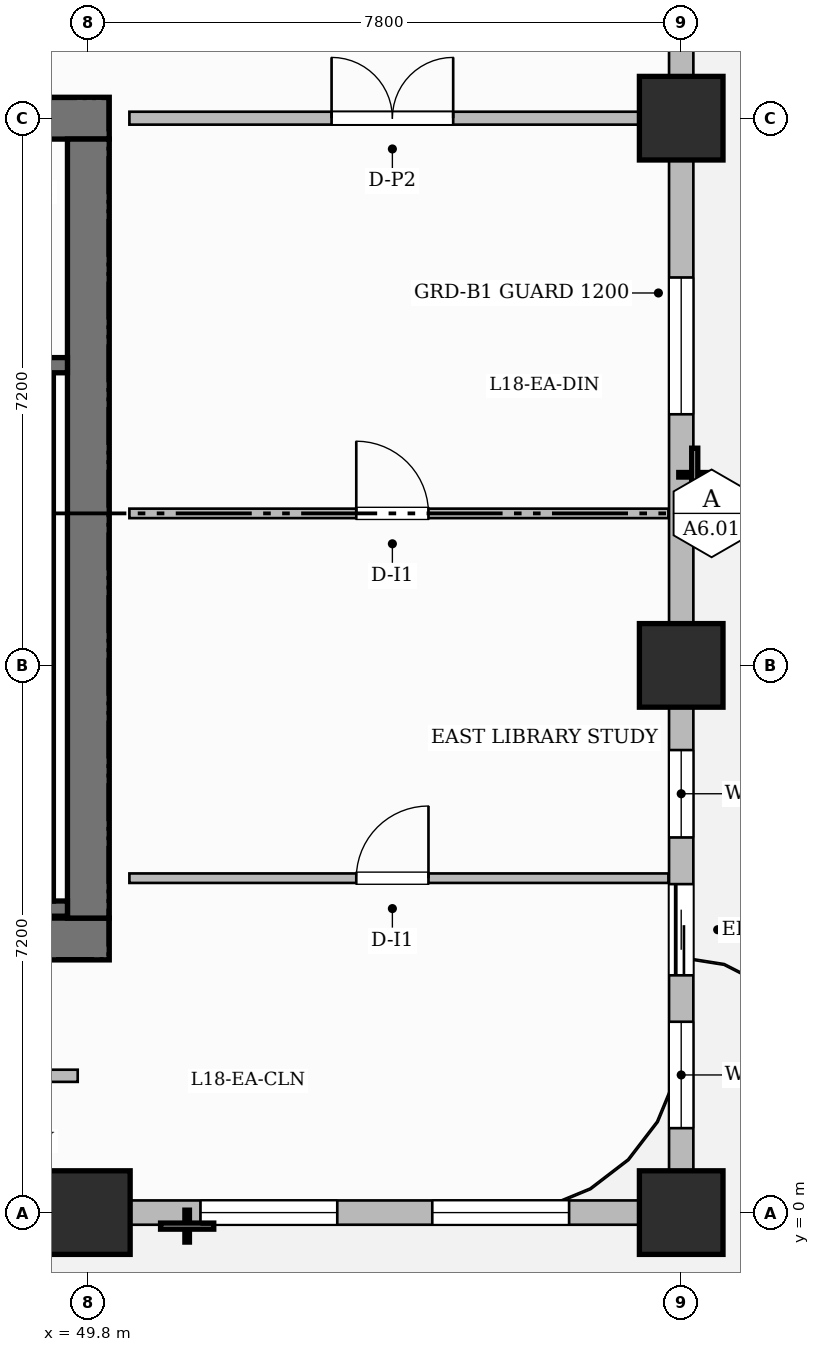
"""IFC4 building model, lengths in metres.
Left out: names, types, materials, properties, quantities, classifications, styles, units other than length and angle.
Written with IfcOpenShell. Run it as: python <this file> out.ifc"""

import sys

from ifc_helpers import new_model, si_unit, direction, frame, frame_2d, origin, origin_2d, place, context, subcontext, project, spatial, rectangle, extrude, source, transform, mapped, element, fill, save


model = new_model("IFC4")
c1 = context("Model", 3, precision=1e-05, world=origin(), true_north=direction((0.0, 1.0)))
c2 = subcontext(c1, "Body", "Model", "MODEL_VIEW")
j1 = project(units=[si_unit("LENGTHUNIT", "METRE"), si_unit("PLANEANGLEUNIT", "RADIAN")], contexts=[c1])
p1 = place(None, origin())
s1 = spatial("IfcSite", under=j1, at=p1, CompositionType="ELEMENT")
p2 = place(p1, origin())
s2 = spatial("IfcBuilding", under=s1, at=p2, CompositionType="ELEMENT")
p3 = place(p2, frame((0.0, 0.0, 76.8)))
s3 = spatial("IfcBuildingStorey", under=s2, at=p3, CompositionType="ELEMENT", Elevation=76.8)
p4 = place(p3, frame((34.525, 3.6, 0.0), z_axis=(0.0, 0.0, 1.0), x_axis=(1.0, 0.0, 0.0)))
e1 = element("IfcWall", 1, at=p4, inside=s3, PredefinedType="SHEAR", context=c2, shape_type="SweptSolid", body=[
    extrude(rectangle(XDim=15.55, YDim=0.55, at=frame_2d((7.775, 0.0))), origin(), (0.0, 0.0, 1.0), 3.7),
])
p5 = place(p4, frame((4.475, 0.0, 0.0)))
e2 = element("IfcOpeningElement", 2, at=p5, cuts=e1, PredefinedType="OPENING", context=c2, shape_type="SweptSolid", body=[
    extrude(rectangle(XDim=0.9, YDim=2.1, at=frame_2d((0.45, 1.05))), frame((0.0, 0.285, 0.0), z_axis=(0.0, -1.0, 0.0), x_axis=(1.0, 0.0, 0.0)), (0.0, 0.0, 1.0), 0.57),
])
p6 = place(p4, frame((6.925, 0.0, 0.0)))
e3 = element("IfcOpeningElement", 3, at=p6, cuts=e1, PredefinedType="OPENING", context=c2, shape_type="SweptSolid", body=[
    extrude(rectangle(XDim=0.9, YDim=2.1, at=frame_2d((0.45, 1.05))), frame((0.0, 0.285, 0.0), z_axis=(0.0, -1.0, 0.0), x_axis=(1.0, 0.0, 0.0)), (0.0, 0.0, 1.0), 0.57),
])
p7 = place(p3, frame((34.525, 14.4, 0.0), z_axis=(0.0, 0.0, 1.0), x_axis=(1.0, 0.0, 0.0)))
e4 = element("IfcWall", 4, at=p7, inside=s3, PredefinedType="SHEAR", context=c2, shape_type="SweptSolid", body=[
    extrude(rectangle(XDim=15.55, YDim=0.55, at=frame_2d((7.775, 0.0))), origin(), (0.0, 0.0, 1.0), 3.7),
])
p8 = place(p7, frame((5.405, 0.0, 0.0)))
e5 = element("IfcOpeningElement", 5, at=p8, cuts=e4, PredefinedType="OPENING", context=c2, shape_type="SweptSolid", body=[
    extrude(rectangle(XDim=1.5, YDim=2.2, at=frame_2d((0.75, 1.1))), frame((0.0, 0.285, 0.0), z_axis=(0.0, -1.0, 0.0), x_axis=(1.0, 0.0, 0.0)), (0.0, 0.0, 1.0), 0.57),
])
p9 = place(p7, frame((1.62, 0.0, 0.0)))
e6 = element("IfcOpeningElement", 6, at=p9, cuts=e4, PredefinedType="OPENING", context=c2, shape_type="SweptSolid", body=[
    extrude(rectangle(XDim=1.05, YDim=2.15, at=frame_2d((0.525, 1.075))), frame((0.0, 0.285, 0.0), z_axis=(0.0, -1.0, 0.0), x_axis=(1.0, 0.0, 0.0)), (0.0, 0.0, 1.0), 0.57),
])
p10 = place(p7, frame((11.25, 0.0, 0.0)))
e7 = element("IfcOpeningElement", 7, at=p10, cuts=e4, PredefinedType="OPENING", context=c2, shape_type="SweptSolid", body=[
    extrude(rectangle(XDim=1.05, YDim=2.15, at=frame_2d((0.525, 1.075))), frame((0.0, 0.285, 0.0), z_axis=(0.0, -1.0, 0.0), x_axis=(1.0, 0.0, 0.0)), (0.0, 0.0, 1.0), 0.57),
])
p11 = place(p3, frame((49.8, 3.875, 0.0), z_axis=(0.0, 0.0, 1.0), x_axis=(0.0, 1.0, 0.0)))
e8 = element("IfcWall", 8, at=p11, inside=s3, PredefinedType="SHEAR", context=c2, shape_type="SweptSolid", body=[
    extrude(rectangle(XDim=10.25, YDim=0.55, at=frame_2d((5.125, 0.0))), origin(), (0.0, 0.0, 1.0), 3.7),
])
m1 = source(origin(), c2, "Body", "SweptSolid", [
    extrude(rectangle(XDim=1.1, YDim=1.1, at=origin_2d()), origin(), (0.0, 0.0, 1.0), 3.7),
])
for number, where, z_axis, x_axis in (
    (9, (49.8, 0.0, 0.0), (0.0, 0.0, 1.0), (1.0, 0.0, 0.0)),
    (10, (57.6, 0.0, 0.0), (0.0, 0.0, 1.0), (1.0, 0.0, 0.0)),
    (11, (57.6, 7.2, 0.0), (0.0, 0.0, 1.0), (1.0, 0.0, 0.0)),
    (12, (57.6, 14.4, 0.0), (0.0, 0.0, 1.0), (1.0, 0.0, 0.0)),
):
    element("IfcColumn", number, at=place(p3, frame(where, z_axis=z_axis, x_axis=x_axis)), inside=s3, PredefinedType="COLUMN", context=c2, shape_type="MappedRepresentation", body=[
        mapped(m1, transform((0.0, 0.0, 0.0), scale=1.0)),
    ])
p12 = place(p3, frame((43.12, 4.0, 0.0), z_axis=(0.0, 0.0, 1.0), x_axis=(1.0, 0.0, 0.0)))
e13 = element("IfcWall", 13, at=p12, inside=s3, PredefinedType="SHEAR", context=c2, shape_type="SweptSolid", body=[
    extrude(rectangle(XDim=6.405, YDim=0.2, at=frame_2d((3.202, 0.0))), origin(), (0.0, 0.0, 1.0), 3.7),
])
p13 = place(p3, frame((49.24, 4.1, 0.0), z_axis=(0.0, 0.0, 1.0), x_axis=(0.0, 1.0, 0.0)))
e14 = element("IfcWall", 14, at=p13, inside=s3, PredefinedType="SHEAR", context=c2, shape_type="SweptSolid", body=[
    extrude(rectangle(XDim=6.95, YDim=0.2, at=frame_2d((3.475, 0.0))), origin(), (0.0, 0.0, 1.0), 3.7),
])
p14 = place(p3, frame((43.12, 11.15, 0.0), z_axis=(0.0, 0.0, 1.0), x_axis=(1.0, 0.0, 0.0)))
e15 = element("IfcWall", 15, at=p14, inside=s3, PredefinedType="SHEAR", context=c2, shape_type="SweptSolid", body=[
    extrude(rectangle(XDim=6.405, YDim=0.2, at=frame_2d((3.202, 0.0))), origin(), (0.0, 0.0, 1.0), 3.7),
])
p15 = place(p14, frame((1.045, 0.0, 0.0)))
e16 = element("IfcOpeningElement", 16, at=p15, cuts=e15, PredefinedType="OPENING", context=c2, shape_type="SweptSolid", body=[
    extrude(rectangle(XDim=1.05, YDim=2.2, at=frame_2d((0.525, 1.1))), frame((0.0, 0.11, 0.0), z_axis=(0.0, -1.0, 0.0), x_axis=(1.0, 0.0, 0.0)), (0.0, 0.0, 1.0), 0.22),
])
p16 = place(p14, frame((4.125, 0.0, 0.0)))
e17 = element("IfcOpeningElement", 17, at=p16, cuts=e15, PredefinedType="OPENING", context=c2, shape_type="SweptSolid", body=[
    extrude(rectangle(XDim=1.05, YDim=2.2, at=frame_2d((0.525, 1.1))), frame((0.0, 0.11, 0.0), z_axis=(0.0, -1.0, 0.0), x_axis=(1.0, 0.0, 0.0)), (0.0, 0.0, 1.0), 0.22),
])
p17 = place(p3, frame((30.29, 1.8, 0.0), z_axis=(0.0, 0.0, 1.0), x_axis=(1.0, 0.0, 0.0)))
e18 = element("IfcWall", 18, at=p17, inside=s3, PredefinedType="PARTITIONING", context=c2, shape_type="SweptSolid", body=[
    extrude(rectangle(XDim=19.37, YDim=0.16, at=frame_2d((9.685, 0.0))), origin(), (0.0, 0.0, 1.0), 3.45),
])
p18 = place(p17, frame((2.916, 0.0, 0.0)))
e19 = element("IfcOpeningElement", 19, at=p18, cuts=e18, PredefinedType="OPENING", context=c2, shape_type="SweptSolid", body=[
    extrude(rectangle(XDim=0.9, YDim=2.15, at=frame_2d((0.45, 1.075))), frame((0.0, 0.09, 0.0), z_axis=(0.0, -1.0, 0.0), x_axis=(1.0, 0.0, 0.0)), (0.0, 0.0, 1.0), 0.18),
])
p19 = place(p17, frame((9.66, 0.0, 0.0)))
e20 = element("IfcOpeningElement", 20, at=p19, cuts=e18, PredefinedType="OPENING", context=c2, shape_type="SweptSolid", body=[
    extrude(rectangle(XDim=0.9, YDim=2.15, at=frame_2d((0.45, 1.075))), frame((0.0, 0.09, 0.0), z_axis=(0.0, -1.0, 0.0), x_axis=(1.0, 0.0, 0.0)), (0.0, 0.0, 1.0), 0.18),
])
p20 = place(p17, frame((15.86, 0.0, 0.0)))
e21 = element("IfcOpeningElement", 21, at=p20, cuts=e18, PredefinedType="OPENING", context=c2, shape_type="SweptSolid", body=[
    extrude(rectangle(XDim=0.9, YDim=2.15, at=frame_2d((0.45, 1.075))), frame((0.0, 0.09, 0.0), z_axis=(0.0, -1.0, 0.0), x_axis=(1.0, 0.0, 0.0)), (0.0, 0.0, 1.0), 0.18),
])
p21 = place(p3, frame((50.34, 14.4, 0.0), z_axis=(0.0, 0.0, 1.0), x_axis=(1.0, 0.0, 0.0)))
e22 = element("IfcWall", 22, at=p21, inside=s3, PredefinedType="PARTITIONING", context=c2, shape_type="SweptSolid", body=[
    extrude(rectangle(XDim=7.07, YDim=0.17, at=frame_2d((3.535, 0.0))), origin(), (0.0, 0.0, 1.0), 2.885),
])
p22 = place(p21, frame((2.66, 0.0, 0.0)))
e23 = element("IfcOpeningElement", 23, at=p22, cuts=e22, PredefinedType="OPENING", context=c2, shape_type="SweptSolid", body=[
    extrude(rectangle(XDim=1.6, YDim=2.4, at=frame_2d((0.8, 1.2))), frame((0.0, 0.095, 0.0), z_axis=(0.0, -1.0, 0.0), x_axis=(1.0, 0.0, 0.0)), (0.0, 0.0, 1.0), 0.19),
])
p23 = place(p3, frame((50.34, 9.2, 0.0), z_axis=(0.0, 0.0, 1.0), x_axis=(1.0, 0.0, 0.0)))
e24 = element("IfcWall", 24, at=p23, inside=s3, PredefinedType="PARTITIONING", context=c2, shape_type="SweptSolid", body=[
    extrude(rectangle(XDim=7.092, YDim=0.125, at=frame_2d((3.546, 0.0))), origin(), (0.0, 0.0, 1.0), 3.45),
])
p24 = place(p23, frame((2.985, 0.0, 0.0)))
e25 = element("IfcOpeningElement", 25, at=p24, cuts=e24, PredefinedType="OPENING", context=c2, shape_type="SweptSolid", body=[
    extrude(rectangle(XDim=0.95, YDim=2.15, at=frame_2d((0.475, 1.075))), frame((0.0, 0.073, 0.0), z_axis=(0.0, -1.0, 0.0), x_axis=(1.0, 0.0, 0.0)), (0.0, 0.0, 1.0), 0.145),
])
p25 = place(p3, frame((50.34, 4.4, 0.0), z_axis=(0.0, 0.0, 1.0), x_axis=(1.0, 0.0, 0.0)))
e26 = element("IfcWall", 26, at=p25, inside=s3, PredefinedType="PARTITIONING", context=c2, shape_type="SweptSolid", body=[
    extrude(rectangle(XDim=7.092, YDim=0.125, at=frame_2d((3.546, 0.0))), origin(), (0.0, 0.0, 1.0), 3.45),
])
p26 = place(p25, frame((2.985, 0.0, 0.0)))
e27 = element("IfcOpeningElement", 27, at=p26, cuts=e26, PredefinedType="OPENING", context=c2, shape_type="SweptSolid", body=[
    extrude(rectangle(XDim=0.95, YDim=2.15, at=frame_2d((0.475, 1.075))), frame((0.0, 0.073, 0.0), z_axis=(0.0, -1.0, 0.0), x_axis=(1.0, 0.0, 0.0)), (0.0, 0.0, 1.0), 0.145),
])
p27 = place(p3, frame((14.4, 0.0, 0.0), z_axis=(0.0, 0.0, 1.0), x_axis=(1.0, 0.0, 0.0)))
e28 = element("IfcWall", 28, at=p27, inside=s3, PredefinedType="SOLIDWALL", context=c2, shape_type="SweptSolid", body=[
    extrude(rectangle(XDim=43.2, YDim=0.32, at=frame_2d((21.6, 0.0))), origin(), (0.0, 0.0, 1.0), 2.885),
])
p28 = place(p27, frame((0.85, 0.0, 0.0)))
e29 = element("IfcOpeningElement", 29, at=p28, cuts=e28, PredefinedType="OPENING", context=c2, shape_type="SweptSolid", body=[
    extrude(rectangle(XDim=1.2, YDim=2.2, at=frame_2d((0.6, 1.1))), frame((0.0, 0.17, 0.0), z_axis=(0.0, -1.0, 0.0), x_axis=(1.0, 0.0, 0.0)), (0.0, 0.0, 1.0), 0.34),
])
p29 = place(p27, frame((2.811, 0.0, 0.8)))
e30 = element("IfcOpeningElement", 30, at=p29, cuts=e28, PredefinedType="OPENING", context=c2, shape_type="SweptSolid", body=[
    extrude(rectangle(XDim=1.8, YDim=1.85, at=frame_2d((0.9, 0.925))), frame((0.0, 0.17, 0.0), z_axis=(0.0, -1.0, 0.0), x_axis=(1.0, 0.0, 0.0)), (0.0, 0.0, 1.0), 0.34),
])
p30 = place(p27, frame((5.269, 0.0, 0.8)))
e31 = element("IfcOpeningElement", 31, at=p30, cuts=e28, PredefinedType="OPENING", context=c2, shape_type="SweptSolid", body=[
    extrude(rectangle(XDim=0.95, YDim=1.75, at=frame_2d((0.475, 0.875))), frame((0.0, 0.17, 0.0), z_axis=(0.0, -1.0, 0.0), x_axis=(1.0, 0.0, 0.0)), (0.0, 0.0, 1.0), 0.34),
])
p31 = place(p27, frame((8.389, 0.0, 0.8)))
e32 = element("IfcOpeningElement", 32, at=p31, cuts=e28, PredefinedType="OPENING", context=c2, shape_type="SweptSolid", body=[
    extrude(rectangle(XDim=1.8, YDim=1.85, at=frame_2d((0.9, 0.925))), frame((0.0, 0.17, 0.0), z_axis=(0.0, -1.0, 0.0), x_axis=(1.0, 0.0, 0.0)), (0.0, 0.0, 1.0), 0.34),
])
p32 = place(p27, frame((11.197, 0.0, 0.8)))
e33 = element("IfcOpeningElement", 33, at=p32, cuts=e28, PredefinedType="OPENING", context=c2, shape_type="SweptSolid", body=[
    extrude(rectangle(XDim=1.8, YDim=1.85, at=frame_2d((0.9, 0.925))), frame((0.0, 0.17, 0.0), z_axis=(0.0, -1.0, 0.0), x_axis=(1.0, 0.0, 0.0)), (0.0, 0.0, 1.0), 0.34),
])
p33 = place(p27, frame((16.804, 0.0, 0.8)))
e34 = element("IfcOpeningElement", 34, at=p33, cuts=e28, PredefinedType="OPENING", context=c2, shape_type="SweptSolid", body=[
    extrude(rectangle(XDim=1.8, YDim=1.85, at=frame_2d((0.9, 0.925))), frame((0.0, 0.17, 0.0), z_axis=(0.0, -1.0, 0.0), x_axis=(1.0, 0.0, 0.0)), (0.0, 0.0, 1.0), 0.34),
])
p34 = place(p27, frame((21.521, 0.0, 0.8)))
e35 = element("IfcOpeningElement", 35, at=p34, cuts=e28, PredefinedType="OPENING", context=c2, shape_type="SweptSolid", body=[
    extrude(rectangle(XDim=0.95, YDim=1.75, at=frame_2d((0.475, 0.875))), frame((0.0, 0.17, 0.0), z_axis=(0.0, -1.0, 0.0), x_axis=(1.0, 0.0, 0.0)), (0.0, 0.0, 1.0), 0.34),
])
p35 = place(p27, frame((23.904, 0.0, 0.8)))
e36 = element("IfcOpeningElement", 36, at=p35, cuts=e28, PredefinedType="OPENING", context=c2, shape_type="SweptSolid", body=[
    extrude(rectangle(XDim=1.8, YDim=1.85, at=frame_2d((0.9, 0.925))), frame((0.0, 0.17, 0.0), z_axis=(0.0, -1.0, 0.0), x_axis=(1.0, 0.0, 0.0)), (0.0, 0.0, 1.0), 0.34),
])
p36 = place(p27, frame((29.681, 0.0, 0.8)))
e37 = element("IfcOpeningElement", 37, at=p36, cuts=e28, PredefinedType="OPENING", context=c2, shape_type="SweptSolid", body=[
    extrude(rectangle(XDim=1.8, YDim=1.85, at=frame_2d((0.9, 0.925))), frame((0.0, 0.17, 0.0), z_axis=(0.0, -1.0, 0.0), x_axis=(1.0, 0.0, 0.0)), (0.0, 0.0, 1.0), 0.34),
])
p37 = place(p27, frame((32.327, 0.0, 0.8)))
e38 = element("IfcOpeningElement", 38, at=p37, cuts=e28, PredefinedType="OPENING", context=c2, shape_type="SweptSolid", body=[
    extrude(rectangle(XDim=1.8, YDim=1.85, at=frame_2d((0.9, 0.925))), frame((0.0, 0.17, 0.0), z_axis=(0.0, -1.0, 0.0), x_axis=(1.0, 0.0, 0.0)), (0.0, 0.0, 1.0), 0.34),
])
p38 = place(p27, frame((36.875, 0.0, 0.8)))
e39 = element("IfcOpeningElement", 39, at=p38, cuts=e28, PredefinedType="OPENING", context=c2, shape_type="SweptSolid", body=[
    extrude(rectangle(XDim=1.8, YDim=1.85, at=frame_2d((0.9, 0.925))), frame((0.0, 0.17, 0.0), z_axis=(0.0, -1.0, 0.0), x_axis=(1.0, 0.0, 0.0)), (0.0, 0.0, 1.0), 0.34),
])
p39 = place(p27, frame((39.925, 0.0, 0.8)))
e40 = element("IfcOpeningElement", 40, at=p39, cuts=e28, PredefinedType="OPENING", context=c2, shape_type="SweptSolid", body=[
    extrude(rectangle(XDim=1.8, YDim=1.85, at=frame_2d((0.9, 0.925))), frame((0.0, 0.17, 0.0), z_axis=(0.0, -1.0, 0.0), x_axis=(1.0, 0.0, 0.0)), (0.0, 0.0, 1.0), 0.34),
])
p40 = place(p3, frame((57.6, 0.05, 0.0), z_axis=(0.0, 0.0, 1.0), x_axis=(0.0, 1.0, 0.0)))
e41 = element("IfcWall", 41, at=p40, inside=s3, PredefinedType="SOLIDWALL", context=c2, shape_type="SweptSolid", body=[
    extrude(rectangle(XDim=21.5, YDim=0.32, at=frame_2d((10.75, 0.0))), origin(), (0.0, 0.0, 1.0), 2.885),
])
p41 = place(p40, frame((3.072, 0.0, 0.0)))
e42 = element("IfcOpeningElement", 42, at=p41, cuts=e41, PredefinedType="OPENING", context=c2, shape_type="SweptSolid", body=[
    extrude(rectangle(XDim=1.2, YDim=2.2, at=frame_2d((0.6, 1.1))), frame((0.0, 0.17, 0.0), z_axis=(0.0, -1.0, 0.0), x_axis=(1.0, 0.0, 0.0)), (0.0, 0.0, 1.0), 0.34),
])
p42 = place(p40, frame((1.061, 0.0, 0.8)))
e43 = element("IfcOpeningElement", 43, at=p42, cuts=e41, PredefinedType="OPENING", context=c2, shape_type="SweptSolid", body=[
    extrude(rectangle(XDim=1.4, YDim=1.85, at=frame_2d((0.7, 0.925))), frame((0.0, 0.17, 0.0), z_axis=(0.0, -1.0, 0.0), x_axis=(1.0, 0.0, 0.0)), (0.0, 0.0, 1.0), 0.34),
])
p43 = place(p40, frame((4.886, 0.0, 0.8)))
e44 = element("IfcOpeningElement", 44, at=p43, cuts=e41, PredefinedType="OPENING", context=c2, shape_type="SweptSolid", body=[
    extrude(rectangle(XDim=1.15, YDim=1.8, at=frame_2d((0.575, 0.9))), frame((0.0, 0.17, 0.0), z_axis=(0.0, -1.0, 0.0), x_axis=(1.0, 0.0, 0.0)), (0.0, 0.0, 1.0), 0.34),
])
p44 = place(p40, frame((10.454, 0.0, 0.8)))
e45 = element("IfcOpeningElement", 45, at=p44, cuts=e41, PredefinedType="OPENING", context=c2, shape_type="SweptSolid", body=[
    extrude(rectangle(XDim=1.8, YDim=1.85, at=frame_2d((0.9, 0.925))), frame((0.0, 0.17, 0.0), z_axis=(0.0, -1.0, 0.0), x_axis=(1.0, 0.0, 0.0)), (0.0, 0.0, 1.0), 0.34),
])
p45 = place(p40, frame((15.621, 0.0, 0.8)))
e46 = element("IfcOpeningElement", 46, at=p45, cuts=e41, PredefinedType="OPENING", context=c2, shape_type="SweptSolid", body=[
    extrude(rectangle(XDim=1.4, YDim=1.85, at=frame_2d((0.7, 0.925))), frame((0.0, 0.17, 0.0), z_axis=(0.0, -1.0, 0.0), x_axis=(1.0, 0.0, 0.0)), (0.0, 0.0, 1.0), 0.34),
])
p46 = place(p40, frame((18.229, 0.0, 0.8)))
e47 = element("IfcOpeningElement", 47, at=p46, cuts=e41, PredefinedType="OPENING", context=c2, shape_type="SweptSolid", body=[
    extrude(rectangle(XDim=1.8, YDim=1.85, at=frame_2d((0.9, 0.925))), frame((0.0, 0.17, 0.0), z_axis=(0.0, -1.0, 0.0), x_axis=(1.0, 0.0, 0.0)), (0.0, 0.0, 1.0), 0.34),
])
m2 = source(origin(), c2, "Body", "SweptSolid", [
    extrude(rectangle(XDim=1.6, YDim=2.4, at=frame_2d((0.8, 1.2))), frame((0.0, 0.025, 0.0), z_axis=(0.0, -1.0, 0.0), x_axis=(1.0, 0.0, 0.0)), (0.0, 0.0, 1.0), 0.05),
])
p47 = place(p22, origin())
e48 = element("IfcDoor", 48, at=p47, inside=s3, OperationType="DOUBLE_DOOR_SINGLE_SWING", PredefinedType="DOOR", context=c2, shape_type="MappedRepresentation", body=[
    mapped(m2, transform((0.0, 0.0, 0.0), scale=1.0)),
])
fill(e23, e48)
m3 = source(origin(), c2, "Body", "SweptSolid", [
    extrude(rectangle(XDim=0.95, YDim=2.15, at=frame_2d((0.475, 1.075))), frame((0.0, 0.025, 0.0), z_axis=(0.0, -1.0, 0.0), x_axis=(1.0, 0.0, 0.0)), (0.0, 0.0, 1.0), 0.05),
])
p48 = place(p24, origin())
e49 = element("IfcDoor", 49, at=p48, inside=s3, OperationType="SINGLE_SWING_LEFT", PredefinedType="DOOR", context=c2, shape_type="MappedRepresentation", body=[
    mapped(m3, transform((0.0, 0.0, 0.0), scale=1.0)),
])
fill(e25, e49)
p49 = place(p26, origin())
e50 = element("IfcDoor", 50, at=p49, inside=s3, OperationType="SINGLE_SWING_RIGHT", PredefinedType="DOOR", context=c2, shape_type="MappedRepresentation", body=[
    mapped(m3, transform((0.0, 0.0, 0.0), scale=1.0)),
])
fill(e27, e50)
m4 = source(origin(), c2, "Body", "SweptSolid", [
    extrude(rectangle(XDim=1.2, YDim=2.2, at=frame_2d((0.6, 1.1))), frame((0.0, 0.025, 0.0), z_axis=(0.0, -1.0, 0.0), x_axis=(1.0, 0.0, 0.0)), (0.0, 0.0, 1.0), 0.05),
])
p50 = place(p41, origin())
e51 = element("IfcDoor", 51, at=p50, inside=s3, OperationType="SLIDING_TO_LEFT", PredefinedType="DOOR", context=c2, shape_type="MappedRepresentation", body=[
    mapped(m4, transform((0.0, 0.0, 0.0), scale=1.0)),
])
fill(e42, e51)
m5 = source(origin(), c2, "Body", "SweptSolid", [
    extrude(rectangle(XDim=1.8, YDim=1.85, at=frame_2d((0.9, 0.925))), frame((0.0, 0.03, 0.0), z_axis=(0.0, -1.0, 0.0), x_axis=(1.0, 0.0, 0.0)), (0.0, 0.0, 1.0), 0.06),
])
p51 = place(p38, origin())
e52 = element("IfcWindow", 52, at=p51, inside=s3, PartitioningType="DOUBLE_PANEL_VERTICAL", PredefinedType="WINDOW", context=c2, shape_type="MappedRepresentation", body=[
    mapped(m5, transform((0.0, 0.0, 0.0), scale=1.0)),
])
fill(e39, e52)
p52 = place(p39, origin())
e53 = element("IfcWindow", 53, at=p52, inside=s3, PartitioningType="DOUBLE_PANEL_VERTICAL", PredefinedType="WINDOW", context=c2, shape_type="MappedRepresentation", body=[
    mapped(m5, transform((0.0, 0.0, 0.0), scale=1.0)),
])
fill(e40, e53)
m6 = source(origin(), c2, "Body", "SweptSolid", [
    extrude(rectangle(XDim=1.4, YDim=1.85, at=frame_2d((0.7, 0.925))), frame((0.0, 0.03, 0.0), z_axis=(0.0, -1.0, 0.0), x_axis=(1.0, 0.0, 0.0)), (0.0, 0.0, 1.0), 0.06),
])
p53 = place(p42, origin())
e54 = element("IfcWindow", 54, at=p53, inside=s3, PartitioningType="SINGLE_PANEL", PredefinedType="WINDOW", context=c2, shape_type="MappedRepresentation", body=[
    mapped(m6, transform((0.0, 0.0, 0.0), scale=1.0)),
])
fill(e43, e54)
m7 = source(origin(), c2, "Body", "SweptSolid", [
    extrude(rectangle(XDim=1.15, YDim=1.8, at=frame_2d((0.575, 0.9))), frame((0.0, 0.03, 0.0), z_axis=(0.0, -1.0, 0.0), x_axis=(1.0, 0.0, 0.0)), (0.0, 0.0, 1.0), 0.06),
])
p54 = place(p43, origin())
e55 = element("IfcWindow", 55, at=p54, inside=s3, PartitioningType="SINGLE_PANEL", PredefinedType="WINDOW", context=c2, shape_type="MappedRepresentation", body=[
    mapped(m7, transform((0.0, 0.0, 0.0), scale=1.0)),
])
fill(e44, e55)
p55 = place(p44, origin())
e56 = element("IfcWindow", 56, at=p55, inside=s3, PartitioningType="DOUBLE_PANEL_VERTICAL", PredefinedType="WINDOW", context=c2, shape_type="MappedRepresentation", body=[
    mapped(m5, transform((0.0, 0.0, 0.0), scale=1.0)),
])
fill(e45, e56)
save(model, sys.argv[1])
